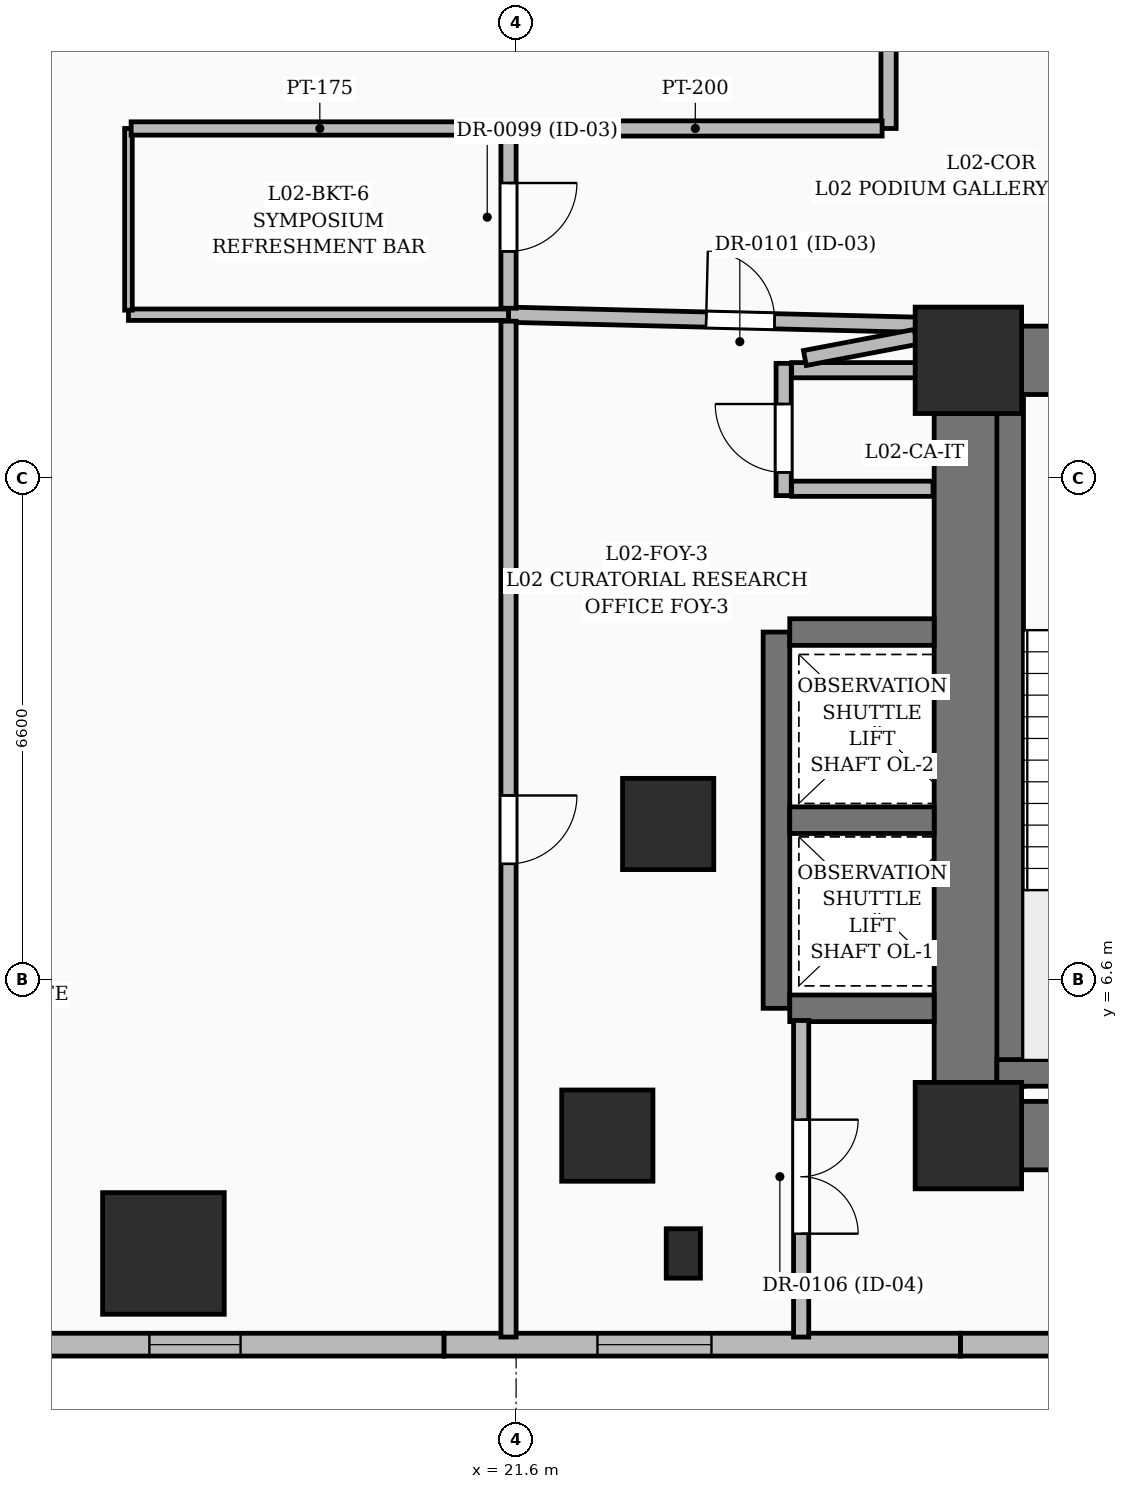
"""IFC4 building model, lengths in metres.
Left out: names, types, materials, properties, quantities, classifications, styles, units other than length and angle.
Written with IfcOpenShell. Run it as: python <this file> out.ifc"""

import sys

from ifc_helpers import new_model, si_unit, direction, frame, frame_2d, origin, origin_2d, place, context, subcontext, project, spatial, rectangle, extrude, element, fill, save


model = new_model("IFC4")
c1 = context("Model", 3, precision=1e-05, world=origin(), true_north=direction((0.0, 1.0)))
c2 = subcontext(c1, "Body", "Model", "MODEL_VIEW")
j1 = project(units=[si_unit("LENGTHUNIT", "METRE"), si_unit("PLANEANGLEUNIT", "RADIAN")], contexts=[c1])
p1 = place(None, origin())
s1 = spatial("IfcSite", under=j1, at=p1, CompositionType="ELEMENT")
p2 = place(p1, origin())
s2 = spatial("IfcBuilding", under=s1, at=p2, CompositionType="ELEMENT")
p3 = place(p2, frame((0.0, 0.0, 12.9)))
s3 = spatial("IfcBuildingStorey", under=s2, at=p3, CompositionType="ELEMENT", Elevation=12.9)
for number, where, z_axis, x_axis in (
    (1, (27.55, 4.55, 0.0), (0.0, 0.0, 1.0), (1.0, 0.0, 0.0)),
    (2, (27.55, 14.75, 0.0), (0.0, 0.0, 1.0), (1.0, 0.0, 0.0)),
):
    element("IfcColumn", number, at=place(p3, frame(where, z_axis=z_axis, x_axis=x_axis)), inside=s3, PredefinedType="COLUMN", context=c2, shape_type="SweptSolid", body=[
        extrude(rectangle(XDim=1.4, YDim=1.4, at=origin_2d()), origin(), (0.0, 0.0, 1.0), 4.5),
    ])
for number, where, z_axis, x_axis in (
    (3, (22.8, 4.55, 0.0), (0.0, 0.0, 1.0), (1.0, 0.0, 0.0)),
    (4, (23.6, 8.65, 0.0), (0.0, 0.0, 1.0), (1.0, 0.0, 0.0)),
):
    element("IfcColumn", number, at=place(p3, frame(where, z_axis=z_axis, x_axis=x_axis)), inside=s3, PredefinedType="COLUMN", context=c2, shape_type="SweptSolid", body=[
        extrude(rectangle(XDim=1.2, YDim=1.2, at=origin_2d()), origin(), (0.0, 0.0, 1.0), 4.5),
    ])
p4 = place(p3, frame((28.25, 4.55, 0.0), z_axis=(0.0, 0.0, 1.0), x_axis=(1.0, 0.0, 0.0)))
e5 = element("IfcWall", 5, at=p4, inside=s3, PredefinedType="SHEAR", context=c2, shape_type="SweptSolid", body=[
    extrude(rectangle(XDim=6.2, YDim=0.9, at=frame_2d((3.1, 0.0))), origin(), (0.0, 0.0, 1.0), 4.5),
])
p5 = place(p3, frame((28.25, 14.75, 0.0), z_axis=(0.0, 0.0, 1.0), x_axis=(1.0, 0.0, 0.0)))
e6 = element("IfcWall", 6, at=p5, inside=s3, PredefinedType="SHEAR", context=c2, shape_type="SweptSolid", body=[
    extrude(rectangle(XDim=6.2, YDim=0.9, at=frame_2d((3.1, 0.0))), origin(), (0.0, 0.0, 1.0), 4.5),
])
p6 = place(p5, frame((0.9, 0.0, 0.0)))
e7 = element("IfcOpeningElement", 7, at=p6, cuts=e6, PredefinedType="OPENING", context=c2, shape_type="SweptSolid", body=[
    extrude(rectangle(XDim=1.1, YDim=2.2, at=frame_2d((0.55, 1.1))), frame((0.0, 0.46, 0.0), z_axis=(0.0, -1.0, 0.0), x_axis=(1.0, 0.0, 0.0)), (0.0, 0.0, 1.0), 0.92),
])
p7 = place(p3, frame((27.55, 5.25, 0.0), z_axis=(0.0, 0.0, 1.0), x_axis=(0.0, 1.0, 0.0)))
e8 = element("IfcWall", 8, at=p7, inside=s3, PredefinedType="SHEAR", context=c2, shape_type="SweptSolid", body=[
    extrude(rectangle(XDim=8.8, YDim=0.9, at=frame_2d((4.4, 0.0))), origin(), (0.0, 0.0, 1.0), 4.5),
])
p8 = place(p3, frame((28.1, 5.2, 0.0), z_axis=(0.0, 0.0, 1.0), x_axis=(0.0, 1.0, 0.0)))
e9 = element("IfcWall", 9, at=p8, inside=s3, PredefinedType="SOLIDWALL", context=c2, shape_type="SweptSolid", body=[
    extrude(rectangle(XDim=9.1, YDim=0.35, at=frame_2d((4.55, 0.0))), origin(), (0.0, 0.0, 1.0), 4.5),
])
p9 = place(p3, frame((27.925, 5.375, 0.0), z_axis=(0.0, 0.0, 1.0), x_axis=(1.0, 0.0, 0.0)))
e10 = element("IfcWall", 10, at=p9, inside=s3, PredefinedType="SOLIDWALL", context=c2, shape_type="SweptSolid", body=[
    extrude(rectangle(XDim=3.55, YDim=0.35, at=frame_2d((1.775, 0.0))), origin(), (0.0, 0.0, 1.0), 4.5),
])
p10 = place(p3, frame((25.025, 6.225, 0.0), z_axis=(0.0, 0.0, 1.0), x_axis=(0.0, 1.0, 0.0)))
e11 = element("IfcWall", 11, at=p10, inside=s3, PredefinedType="SOLIDWALL", context=c2, shape_type="SweptSolid", body=[
    extrude(rectangle(XDim=4.95, YDim=0.35, at=frame_2d((2.475, 0.0))), origin(), (0.0, 0.0, 1.0), 4.5),
])
for number, where, z_axis, x_axis in (
    (12, (25.2, 6.225, 0.0), (0.0, 0.0, 1.0), (1.0, 0.0, 0.0)),
    (13, (25.2, 8.7, 0.0), (0.0, 0.0, 1.0), (1.0, 0.0, 0.0)),
    (14, (25.2, 11.175, 0.0), (0.0, 0.0, 1.0), (1.0, 0.0, 0.0)),
):
    element("IfcWall", number, at=place(p3, frame(where, z_axis=z_axis, x_axis=x_axis)), inside=s3, PredefinedType="SOLIDWALL", context=c2, shape_type="SweptSolid", body=[
        extrude(rectangle(XDim=1.9, YDim=0.35, at=frame_2d((0.95, 0.0))), origin(), (0.0, 0.0, 1.0), 4.5),
    ])
p11 = place(p3, frame((16.96, 3.0, 0.0), z_axis=(0.0, 0.0, 1.0), x_axis=(1.0, 0.0, 0.0)))
e15 = element("IfcColumn", 15, at=p11, inside=s3, PredefinedType="COLUMN", context=c2, shape_type="SweptSolid", body=[
    extrude(rectangle(XDim=1.6, YDim=1.6, at=origin_2d()), origin(), (0.0, 0.0, 1.0), 4.5),
])
p12 = place(p3, frame((23.8, 3.0, 0.0), z_axis=(0.0, 0.0, 1.0), x_axis=(1.0, 0.0, 0.0)))
e16 = element("IfcColumn", 16, at=p12, inside=s3, PredefinedType="PILASTER", context=c2, shape_type="SweptSolid", body=[
    extrude(rectangle(XDim=0.45, YDim=0.65, at=origin_2d()), origin(), (0.0, 0.0, 1.0), 4.5),
])
p13 = place(p3, frame((33.965, 1.8, 0.0), z_axis=(0.0, 0.0, 1.0), x_axis=(-1.0, 0.0, 0.0)))
e17 = element("IfcWall", 17, at=p13, inside=s3, PredefinedType="SOLIDWALL", context=c2, shape_type="SweptSolid", body=[
    extrude(rectangle(XDim=6.52, YDim=0.3, at=frame_2d((3.26, 0.0))), origin(), (0.0, 0.0, 1.0), 4.2),
])
p14 = place(p13, frame((2.2, 0.0, 0.55)))
e18 = element("IfcOpeningElement", 18, at=p14, cuts=e17, PredefinedType="OPENING", context=c2, shape_type="SweptSolid", body=[
    extrude(rectangle(XDim=1.6, YDim=2.2, at=frame_2d((0.8, 1.1))), frame((0.0, 0.16, 0.0), z_axis=(0.0, -1.0, 0.0), x_axis=(1.0, 0.0, 0.0)), (0.0, 0.0, 1.0), 0.32),
])
p15 = place(p3, frame((27.445, 1.8, 0.0), z_axis=(0.0, 0.0, 1.0), x_axis=(-1.0, 0.0, 0.0)))
e19 = element("IfcWall", 19, at=p15, inside=s3, PredefinedType="SOLIDWALL", context=c2, shape_type="SweptSolid", body=[
    extrude(rectangle(XDim=6.795, YDim=0.3, at=frame_2d((3.397, 0.0))), origin(), (0.0, 0.0, 1.0), 4.2),
])
p16 = place(p15, frame((3.275, 0.0, 0.6)))
e20 = element("IfcOpeningElement", 20, at=p16, cuts=e19, PredefinedType="OPENING", context=c2, shape_type="SweptSolid", body=[
    extrude(rectangle(XDim=1.5, YDim=2.1, at=frame_2d((0.75, 1.05))), frame((0.0, 0.16, 0.0), z_axis=(0.0, -1.0, 0.0), x_axis=(1.0, 0.0, 0.0)), (0.0, 0.0, 1.0), 0.32),
])
p17 = place(p3, frame((20.65, 1.8, 0.0), z_axis=(0.0, 0.0, 1.0), x_axis=(-1.0, 0.0, 0.0)))
e21 = element("IfcWall", 21, at=p17, inside=s3, PredefinedType="SOLIDWALL", context=c2, shape_type="SweptSolid", body=[
    extrude(rectangle(XDim=6.795, YDim=0.3, at=frame_2d((3.397, 0.0))), origin(), (0.0, 0.0, 1.0), 4.2),
])
p18 = place(p17, frame((2.675, 0.0, 0.8)))
e22 = element("IfcOpeningElement", 22, at=p18, cuts=e21, PredefinedType="OPENING", context=c2, shape_type="SweptSolid", body=[
    extrude(rectangle(XDim=1.2, YDim=1.8, at=frame_2d((0.6, 0.9))), frame((0.0, 0.16, 0.0), z_axis=(0.0, -1.0, 0.0), x_axis=(1.0, 0.0, 0.0)), (0.0, 0.0, 1.0), 0.32),
])
p19 = place(p3, frame((25.12, 12.97, 0.0), z_axis=(0.0, 0.0, 1.0), x_axis=(0.0, 1.0, 0.0)))
e23 = element("IfcWall", 23, at=p19, inside=s3, PredefinedType="PARTITIONING", context=c2, shape_type="SweptSolid", body=[
    extrude(rectangle(XDim=1.74, YDim=0.2, at=frame_2d((0.87, 0.0))), origin(), (0.0, 0.0, 1.0), 4.2),
])
p20 = place(p19, frame((0.305, 0.0, 0.0)))
e24 = element("IfcOpeningElement", 24, at=p20, cuts=e23, PredefinedType="OPENING", context=c2, shape_type="SweptSolid", body=[
    extrude(rectangle(XDim=0.9, YDim=2.1, at=frame_2d((0.45, 1.05))), frame((0.0, 0.11, 0.0), z_axis=(0.0, -1.0, 0.0), x_axis=(1.0, 0.0, 0.0)), (0.0, 0.0, 1.0), 0.22),
])
for number, where, z_axis, x_axis in (
    (25, (25.225, 14.62, 0.0), (0.0, 0.0, 1.0), (1.0, 0.0, 0.0)),
    (26, (25.225, 13.06, 0.0), (0.0, 0.0, 1.0), (1.0, 0.0, 0.0)),
):
    element("IfcWall", number, at=place(p3, frame(where, z_axis=z_axis, x_axis=x_axis)), inside=s3, PredefinedType="PARTITIONING", context=c2, shape_type="SweptSolid", body=[
        extrude(rectangle(XDim=1.86, YDim=0.2, at=frame_2d((0.93, 0.0))), origin(), (0.0, 0.0, 1.0), 4.2),
    ])
p21 = place(p3, frame((21.5, 15.35, 0.0), z_axis=(0.0, 0.0, 1.0), x_axis=(0.999697218396, -0.024606331118, 0.0)))
e27 = element("IfcWall", 27, at=p21, inside=s3, PredefinedType="PARTITIONING", context=c2, shape_type="SweptSolid", body=[
    extrude(rectangle(XDim=6.102, YDim=0.2, at=frame_2d((3.051, 0.0))), origin(), (0.0, 0.0, 1.0), 3.078),
])
p22 = place(p21, frame((2.601, 0.0, 0.0)))
e28 = element("IfcOpeningElement", 28, at=p22, cuts=e27, PredefinedType="OPENING", context=c2, shape_type="SweptSolid", body=[
    extrude(rectangle(XDim=0.9, YDim=2.1, at=frame_2d((0.45, 1.05))), frame((0.0, 0.11, 0.0), z_axis=(0.0, -1.0, 0.0), x_axis=(1.0, 0.0, 0.0)), (0.0, 0.0, 1.0), 0.22),
])
p23 = place(p3, frame((26.5, 24.5, 0.0), z_axis=(0.0, 0.0, 1.0), x_axis=(0.0, -1.0, 0.0)))
e29 = element("IfcWall", 29, at=p23, inside=s3, PredefinedType="PARTITIONING", context=c2, shape_type="SweptSolid", body=[
    extrude(rectangle(XDim=6.7, YDim=0.2, at=frame_2d((3.35, 0.0))), origin(), (0.0, 0.0, 1.0), 3.637),
])
p24 = place(p23, frame((2.9, 0.0, 0.0)))
e30 = element("IfcOpeningElement", 30, at=p24, cuts=e29, PredefinedType="OPENING", context=c2, shape_type="SweptSolid", body=[
    extrude(rectangle(XDim=0.9, YDim=2.1, at=frame_2d((0.45, 1.05))), frame((0.0, 0.11, 0.0), z_axis=(0.0, -1.0, 0.0), x_axis=(1.0, 0.0, 0.0)), (0.0, 0.0, 1.0), 0.22),
])
p25 = place(p3, frame((26.415, 17.8, 0.0), z_axis=(0.0, 0.0, 1.0), x_axis=(-1.0, 0.0, 0.0)))
e31 = element("IfcWall", 31, at=p25, inside=s3, PredefinedType="PARTITIONING", context=c2, shape_type="SweptSolid", body=[
    extrude(rectangle(XDim=4.915, YDim=0.2, at=frame_2d((2.458, 0.0))), origin(), (0.0, 0.0, 1.0), 3.078),
])
p26 = place(p3, frame((21.5, 17.715, 0.0), z_axis=(0.0, 0.0, 1.0), x_axis=(0.0, -1.0, 0.0)))
e32 = element("IfcWall", 32, at=p26, inside=s3, PredefinedType="PARTITIONING", context=c2, shape_type="SweptSolid", body=[
    extrude(rectangle(XDim=2.28, YDim=0.2, at=frame_2d((1.14, 0.0))), origin(), (0.0, 0.0, 1.0), 3.637),
])
p27 = place(p26, frame((0.632, 0.0, 0.0)))
e33 = element("IfcOpeningElement", 33, at=p27, cuts=e32, PredefinedType="OPENING", context=c2, shape_type="SweptSolid", body=[
    extrude(rectangle(XDim=0.9, YDim=2.1, at=frame_2d((0.45, 1.05))), frame((0.0, 0.11, 0.0), z_axis=(0.0, -1.0, 0.0), x_axis=(1.0, 0.0, 0.0)), (0.0, 0.0, 1.0), 0.22),
])
p28 = place(p3, frame((25.35, 6.065, 0.0), z_axis=(0.0, 0.0, 1.0), x_axis=(0.0, -1.0, 0.0)))
e34 = element("IfcWall", 34, at=p28, inside=s3, PredefinedType="PARTITIONING", context=c2, shape_type="SweptSolid", body=[
    extrude(rectangle(XDim=4.165, YDim=0.2, at=frame_2d((2.083, 0.0))), origin(), (0.0, 0.0, 1.0), 2.97),
])
p29 = place(p28, frame((1.305, 0.0, 0.0)))
e35 = element("IfcOpeningElement", 35, at=p29, cuts=e34, PredefinedType="OPENING", context=c2, shape_type="SweptSolid", body=[
    extrude(rectangle(XDim=1.5, YDim=2.2, at=frame_2d((0.75, 1.1))), frame((0.0, 0.11, 0.0), z_axis=(0.0, -1.0, 0.0), x_axis=(1.0, 0.0, 0.0)), (0.0, 0.0, 1.0), 0.22),
])
p30 = place(p3, frame((21.5, 15.265, 0.0), z_axis=(0.0, 0.0, 1.0), x_axis=(0.0, -1.0, 0.0)))
e36 = element("IfcWall", 36, at=p30, inside=s3, PredefinedType="PARTITIONING", context=c2, shape_type="SweptSolid", body=[
    extrude(rectangle(XDim=13.365, YDim=0.2, at=frame_2d((6.683, 0.0))), origin(), (0.0, 0.0, 1.0), 2.97),
])
p31 = place(p30, frame((6.24, 0.0, 0.0)))
e37 = element("IfcOpeningElement", 37, at=p31, cuts=e36, PredefinedType="OPENING", context=c2, shape_type="SweptSolid", body=[
    extrude(rectangle(XDim=0.9, YDim=2.1, at=frame_2d((0.45, 1.05))), frame((0.0, 0.11, 0.0), z_axis=(0.0, -1.0, 0.0), x_axis=(1.0, 0.0, 0.0)), (0.0, 0.0, 1.0), 0.22),
])
p32 = place(p3, frame((21.5, 15.35, 0.0), z_axis=(0.0, 0.0, 1.0), x_axis=(-1.0, 0.0, 0.0)))
e38 = element("IfcWall", 38, at=p32, inside=s3, PredefinedType="PARTITIONING", context=c2, shape_type="SweptSolid", body=[
    extrude(rectangle(XDim=5.0, YDim=0.15, at=frame_2d((2.5, 0.0))), origin(), (0.0, 0.0, 1.0), 3.637),
])
p33 = place(p3, frame((16.5, 15.41, 0.0), z_axis=(0.0, 0.0, 1.0), x_axis=(0.0, 1.0, 0.0)))
e39 = element("IfcWall", 39, at=p33, inside=s3, PredefinedType="PARTITIONING", context=c2, shape_type="SweptSolid", body=[
    extrude(rectangle(XDim=2.39, YDim=0.1, at=frame_2d((1.195, 0.0))), origin(), (0.0, 0.0, 1.0), 4.2),
])
p34 = place(p3, frame((16.535, 17.8, 0.0), z_axis=(0.0, 0.0, 1.0), x_axis=(1.0, 0.0, 0.0)))
e40 = element("IfcWall", 40, at=p34, inside=s3, PredefinedType="PARTITIONING", context=c2, shape_type="SweptSolid", body=[
    extrude(rectangle(XDim=4.965, YDim=0.175, at=frame_2d((2.482, 0.0))), origin(), (0.0, 0.0, 1.0), 3.637),
])
p35 = place(p3, frame((25.399, 14.78, 0.0), z_axis=(0.0, 0.0, 1.0), x_axis=(0.982293908453, 0.187346410202, 0.0)))
e41 = element("IfcWall", 41, at=p35, inside=s3, PredefinedType="PARTITIONING", context=c2, shape_type="SweptSolid", body=[
    extrude(rectangle(XDim=1.484, YDim=0.2, at=frame_2d((0.742, 0.0))), origin(), (0.0, 0.0, 1.0), 3.078),
])
p36 = place(p16, origin())
e42 = element("IfcWindow", 42, at=p36, inside=s3, PartitioningType="SINGLE_PANEL", PredefinedType="WINDOW", context=c2, shape_type="SweptSolid", body=[
    extrude(rectangle(XDim=1.5, YDim=2.1, at=frame_2d((0.75, 1.05))), frame((0.0, 0.03, 0.0), z_axis=(0.0, -1.0, 0.0), x_axis=(1.0, 0.0, 0.0)), (0.0, 0.0, 1.0), 0.06),
])
fill(e20, e42)
p37 = place(p18, origin())
e43 = element("IfcWindow", 43, at=p37, inside=s3, PartitioningType="SINGLE_PANEL", PredefinedType="WINDOW", context=c2, shape_type="SweptSolid", body=[
    extrude(rectangle(XDim=1.2, YDim=1.8, at=frame_2d((0.6, 0.9))), frame((0.0, 0.03, 0.0), z_axis=(0.0, -1.0, 0.0), x_axis=(1.0, 0.0, 0.0)), (0.0, 0.0, 1.0), 0.06),
])
fill(e22, e43)
p38 = place(p20, origin())
e44 = element("IfcDoor", 44, at=p38, inside=s3, OperationType="SINGLE_SWING_RIGHT", PredefinedType="DOOR", context=c2, shape_type="SweptSolid", body=[
    extrude(rectangle(XDim=0.9, YDim=2.1, at=frame_2d((0.45, 1.05))), frame((0.0, 0.025, 0.0), z_axis=(0.0, -1.0, 0.0), x_axis=(1.0, 0.0, 0.0)), (0.0, 0.0, 1.0), 0.05),
])
fill(e24, e44)
p39 = place(p27, origin())
e45 = element("IfcDoor", 45, at=p39, inside=s3, OperationType="SINGLE_SWING_LEFT", PredefinedType="DOOR", context=c2, shape_type="SweptSolid", body=[
    extrude(rectangle(XDim=0.9, YDim=2.1, at=frame_2d((0.45, 1.05))), frame((0.0, 0.025, 0.0), z_axis=(0.0, -1.0, 0.0), x_axis=(1.0, 0.0, 0.0)), (0.0, 0.0, 1.0), 0.05),
])
fill(e33, e45)
p40 = place(p22, origin())
e46 = element("IfcDoor", 46, at=p40, inside=s3, OperationType="SINGLE_SWING_LEFT", PredefinedType="DOOR", context=c2, shape_type="SweptSolid", body=[
    extrude(rectangle(XDim=0.9, YDim=2.1, at=frame_2d((0.45, 1.05))), frame((0.0, 0.025, 0.0), z_axis=(0.0, -1.0, 0.0), x_axis=(1.0, 0.0, 0.0)), (0.0, 0.0, 1.0), 0.05),
])
fill(e28, e46)
p41 = place(p29, origin())
e47 = element("IfcDoor", 47, at=p41, inside=s3, OperationType="DOUBLE_DOOR_SINGLE_SWING", PredefinedType="DOOR", context=c2, shape_type="SweptSolid", body=[
    extrude(rectangle(XDim=1.5, YDim=2.2, at=frame_2d((0.75, 1.1))), frame((0.0, 0.025, 0.0), z_axis=(0.0, -1.0, 0.0), x_axis=(1.0, 0.0, 0.0)), (0.0, 0.0, 1.0), 0.05),
])
fill(e35, e47)
p42 = place(p31, origin())
e48 = element("IfcDoor", 48, at=p42, inside=s3, OperationType="SINGLE_SWING_LEFT", PredefinedType="DOOR", context=c2, shape_type="SweptSolid", body=[
    extrude(rectangle(XDim=0.9, YDim=2.1, at=frame_2d((0.45, 1.05))), frame((0.0, 0.025, 0.0), z_axis=(0.0, -1.0, 0.0), x_axis=(1.0, 0.0, 0.0)), (0.0, 0.0, 1.0), 0.05),
])
fill(e37, e48)
save(model, sys.argv[1])
